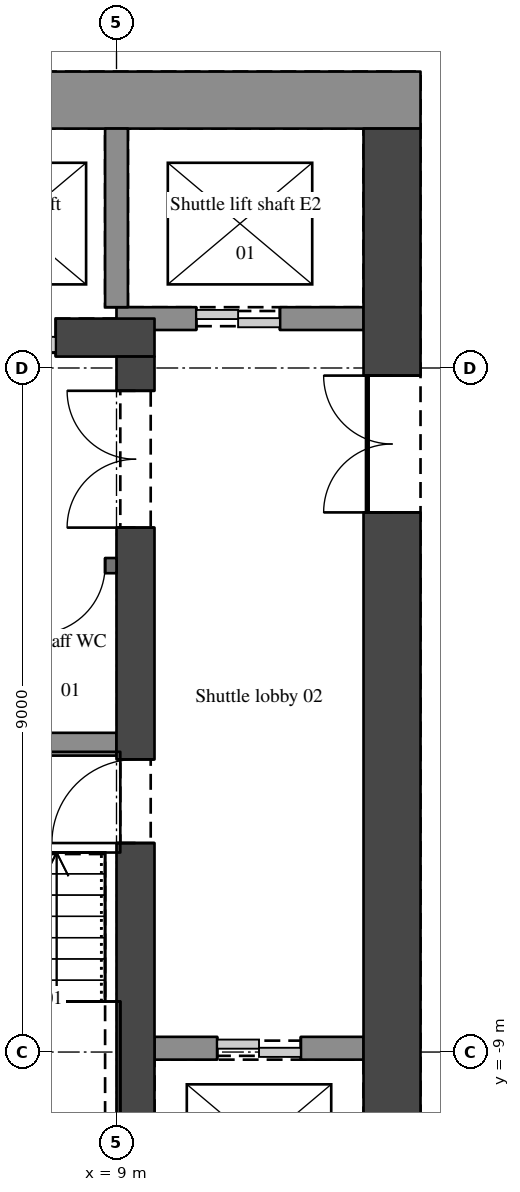
"""IFC4 building model, lengths in metres.
Left out: names, types, materials, properties, quantities, classifications, styles, units other than length and angle.
Written with IfcOpenShell. Run it as: python <this file> out.ifc"""

import sys

from ifc_helpers import new_model, si_unit, direction, frame, frame_2d, origin, place, context, subcontext, project, spatial, rectangle, extrude, element, fill, save


model = new_model("IFC4")
c1 = context("Model", 3, precision=1e-05, world=origin(), true_north=direction((0.0, 1.0)))
c2 = subcontext(c1, "Body", "Model", "MODEL_VIEW")
j1 = project(units=[si_unit("LENGTHUNIT", "METRE"), si_unit("PLANEANGLEUNIT", "RADIAN")], contexts=[c1])
p1 = place(None, origin())
s1 = spatial("IfcSite", under=j1, at=p1, CompositionType="ELEMENT")
p2 = place(p1, origin())
s2 = spatial("IfcBuilding", under=s1, at=p2, CompositionType="ELEMENT")
p3 = place(p2, frame((0.0, 0.0, 162.3)))
s3 = spatial("IfcBuildingStorey", under=s2, at=p3, CompositionType="ELEMENT", Elevation=162.3)
p4 = place(p3, frame((-13.0, 3.525, 0.0), z_axis=(0.0, 0.0, 1.0), x_axis=(1.0, 0.0, 0.0)))
e1 = element("IfcWall", 1, at=p4, inside=s3, PredefinedType="SHEAR", context=c2, shape_type="SweptSolid", body=[
    extrude(rectangle(XDim=26.0, YDim=0.75, at=frame_2d((13.0, 0.0))), origin(), (0.0, 0.0, 1.0), 5.4),
])
p5 = place(p3, frame((12.625, -11.5, 0.0), z_axis=(0.0, 0.0, 1.0), x_axis=(0.0, 1.0, 0.0)))
e2 = element("IfcWall", 2, at=p5, inside=s3, PredefinedType="SHEAR", context=c2, shape_type="SweptSolid", body=[
    extrude(rectangle(XDim=14.65, YDim=0.75, at=frame_2d((7.325, 0.0))), origin(), (0.0, 0.0, 1.0), 5.4),
])
p6 = place(p5, frame((9.6, 0.0, 0.0)))
e3 = element("IfcOpeningElement", 3, at=p6, cuts=e2, PredefinedType="OPENING", context=c2, shape_type="SweptSolid", body=[
    extrude(rectangle(XDim=1.8, YDim=2.1, at=frame_2d((0.9, 1.05))), frame((0.0, 0.385, 0.0), z_axis=(0.0, -1.0, 0.0), x_axis=(1.0, 0.0, 0.0)), (0.0, 0.0, 1.0), 0.77),
])
p7 = place(p3, frame((-9.5, 0.4, 0.0), z_axis=(0.0, 0.0, 1.0), x_axis=(1.0, 0.0, 0.0)))
e4 = element("IfcWall", 4, at=p7, inside=s3, PredefinedType="SHEAR", context=c2, shape_type="SweptSolid", body=[
    extrude(rectangle(XDim=19.0, YDim=0.5, at=frame_2d((9.5, 0.0))), origin(), (0.0, 0.0, 1.0), 5.4),
])
p8 = place(p7, frame((1.3, 0.0, 0.0)))
e5 = element("IfcOpeningElement", 5, at=p8, cuts=e4, PredefinedType="OPENING", context=c2, shape_type="SweptSolid", body=[
    extrude(rectangle(XDim=1.1, YDim=2.1, at=frame_2d((0.55, 1.05))), frame((0.0, 0.26, 0.0), z_axis=(0.0, -1.0, 0.0), x_axis=(1.0, 0.0, 0.0)), (0.0, 0.0, 1.0), 0.52),
])
p9 = place(p7, frame((4.0, 0.0, 0.0)))
e6 = element("IfcOpeningElement", 6, at=p9, cuts=e4, PredefinedType="OPENING", context=c2, shape_type="SweptSolid", body=[
    extrude(rectangle(XDim=1.1, YDim=2.1, at=frame_2d((0.55, 1.05))), frame((0.0, 0.26, 0.0), z_axis=(0.0, -1.0, 0.0), x_axis=(1.0, 0.0, 0.0)), (0.0, 0.0, 1.0), 0.52),
])
p10 = place(p7, frame((6.7, 0.0, 0.0)))
e7 = element("IfcOpeningElement", 7, at=p10, cuts=e4, PredefinedType="OPENING", context=c2, shape_type="SweptSolid", body=[
    extrude(rectangle(XDim=1.1, YDim=2.1, at=frame_2d((0.55, 1.05))), frame((0.0, 0.26, 0.0), z_axis=(0.0, -1.0, 0.0), x_axis=(1.0, 0.0, 0.0)), (0.0, 0.0, 1.0), 0.52),
])
p11 = place(p7, frame((11.2, 0.0, 0.0)))
e8 = element("IfcOpeningElement", 8, at=p11, cuts=e4, PredefinedType="OPENING", context=c2, shape_type="SweptSolid", body=[
    extrude(rectangle(XDim=1.1, YDim=2.1, at=frame_2d((0.55, 1.05))), frame((0.0, 0.26, 0.0), z_axis=(0.0, -1.0, 0.0), x_axis=(1.0, 0.0, 0.0)), (0.0, 0.0, 1.0), 0.52),
])
p12 = place(p7, frame((13.9, 0.0, 0.0)))
e9 = element("IfcOpeningElement", 9, at=p12, cuts=e4, PredefinedType="OPENING", context=c2, shape_type="SweptSolid", body=[
    extrude(rectangle(XDim=1.1, YDim=2.1, at=frame_2d((0.55, 1.05))), frame((0.0, 0.26, 0.0), z_axis=(0.0, -1.0, 0.0), x_axis=(1.0, 0.0, 0.0)), (0.0, 0.0, 1.0), 0.52),
])
p13 = place(p7, frame((16.6, 0.0, 0.0)))
e10 = element("IfcOpeningElement", 10, at=p13, cuts=e4, PredefinedType="OPENING", context=c2, shape_type="SweptSolid", body=[
    extrude(rectangle(XDim=1.1, YDim=2.1, at=frame_2d((0.55, 1.05))), frame((0.0, 0.26, 0.0), z_axis=(0.0, -1.0, 0.0), x_axis=(1.0, 0.0, 0.0)), (0.0, 0.0, 1.0), 0.52),
])
p14 = place(p3, frame((9.25, -11.5, 0.0), z_axis=(0.0, 0.0, 1.0), x_axis=(0.0, 1.0, 0.0)))
e11 = element("IfcWall", 11, at=p14, inside=s3, PredefinedType="SHEAR", context=c2, shape_type="SweptSolid", body=[
    extrude(rectangle(XDim=11.65, YDim=0.5, at=frame_2d((5.825, 0.0))), origin(), (0.0, 0.0, 1.0), 5.4),
])
p15 = place(p14, frame((9.4, 0.0, 0.0)))
e12 = element("IfcOpeningElement", 12, at=p15, cuts=e11, PredefinedType="OPENING", context=c2, shape_type="SweptSolid", body=[
    extrude(rectangle(XDim=1.8, YDim=2.1, at=frame_2d((0.9, 1.05))), frame((0.0, 0.26, 0.0), z_axis=(0.0, -1.0, 0.0), x_axis=(1.0, 0.0, 0.0)), (0.0, 0.0, 1.0), 0.52),
])
p16 = place(p14, frame((5.25, 0.0, 0.0)))
e13 = element("IfcOpeningElement", 13, at=p16, cuts=e11, PredefinedType="OPENING", context=c2, shape_type="SweptSolid", body=[
    extrude(rectangle(XDim=1.1, YDim=2.1, at=frame_2d((0.55, 1.05))), frame((0.0, 0.26, 0.0), z_axis=(0.0, -1.0, 0.0), x_axis=(1.0, 0.0, 0.0)), (0.0, 0.0, 1.0), 0.52),
])
p17 = place(p3, frame((9.5, -8.95, 0.0), z_axis=(0.0, 0.0, 1.0), x_axis=(1.0, 0.0, 0.0)))
e14 = element("IfcWall", 14, at=p17, inside=s3, PredefinedType="SHEAR", context=c2, shape_type="SweptSolid", body=[
    extrude(rectangle(XDim=2.75, YDim=0.3, at=frame_2d((1.375, 0.0))), origin(), (0.0, 0.0, 1.0), 5.4),
])
p18 = place(p17, frame((0.825, 0.0, 0.0)))
e15 = element("IfcOpeningElement", 15, at=p18, cuts=e14, PredefinedType="OPENING", context=c2, shape_type="SweptSolid", body=[
    extrude(rectangle(XDim=1.1, YDim=2.1, at=frame_2d((0.55, 1.05))), frame((0.0, 0.16, 0.0), z_axis=(0.0, -1.0, 0.0), x_axis=(1.0, 0.0, 0.0)), (0.0, 0.0, 1.0), 0.32),
])
p19 = place(p3, frame((2.25, -4.95, 0.0), z_axis=(0.0, 0.0, 1.0), x_axis=(1.0, 0.0, 0.0)))
e16 = element("IfcWall", 16, at=p19, inside=s3, PredefinedType="SHEAR", context=c2, shape_type="SweptSolid", body=[
    extrude(rectangle(XDim=6.75, YDim=0.3, at=frame_2d((3.375, 0.0))), origin(), (0.0, 0.0, 1.0), 5.4),
])
p20 = place(p3, frame((9.0, -2.6, 0.0), z_axis=(0.0, 0.0, 1.0), x_axis=(-1.0, 0.0, 0.0)))
e17 = element("IfcWall", 17, at=p20, inside=s3, PredefinedType="SOLIDWALL", context=c2, shape_type="SweptSolid", body=[
    extrude(rectangle(XDim=1.2, YDim=0.2, at=frame_2d((0.6, 0.0))), origin(), (0.0, 0.0, 1.0), 5.1),
])
p21 = place(p20, frame((0.15, 0.0, 0.0)))
e18 = element("IfcOpeningElement", 18, at=p21, cuts=e17, PredefinedType="OPENING", context=c2, shape_type="SweptSolid", body=[
    extrude(rectangle(XDim=0.9, YDim=2.1, at=frame_2d((0.45, 1.05))), frame((0.0, 0.11, 0.0), z_axis=(0.0, -1.0, 0.0), x_axis=(1.0, 0.0, 0.0)), (0.0, 0.0, 1.0), 0.22),
])
p22 = place(p3, frame((12.25, 0.65, 0.0), z_axis=(0.0, 0.0, 1.0), x_axis=(-1.0, 0.0, 0.0)))
e19 = element("IfcWall", 19, at=p22, inside=s3, PredefinedType="SHEAR", context=c2, shape_type="SweptSolid", body=[
    extrude(rectangle(XDim=3.25, YDim=0.3, at=frame_2d((1.625, 0.0))), origin(), (0.0, 0.0, 1.0), 5.4),
])
p23 = place(p22, frame((1.1, 0.0, 0.0)))
e20 = element("IfcOpeningElement", 20, at=p23, cuts=e19, PredefinedType="OPENING", context=c2, shape_type="SweptSolid", body=[
    extrude(rectangle(XDim=1.1, YDim=2.1, at=frame_2d((0.55, 1.05))), frame((0.0, 0.16, 0.0), z_axis=(0.0, -1.0, 0.0), x_axis=(1.0, 0.0, 0.0)), (0.0, 0.0, 1.0), 0.32),
])
p24 = place(p3, frame((9.0, 0.8, 0.0), z_axis=(0.0, 0.0, 1.0), x_axis=(0.0, 1.0, 0.0)))
e21 = element("IfcWall", 21, at=p24, inside=s3, PredefinedType="SHEAR", context=c2, shape_type="SweptSolid", body=[
    extrude(rectangle(XDim=2.35, YDim=0.3, at=frame_2d((1.175, 0.0))), origin(), (0.0, 0.0, 1.0), 5.4),
])
p25 = place(p6, origin())
e22 = element("IfcDoor", 22, at=p25, inside=s3, OperationType="DOUBLE_DOOR_SINGLE_SWING", PredefinedType="DOOR", context=c2, shape_type="SweptSolid", body=[
    extrude(rectangle(XDim=1.8, YDim=2.1, at=frame_2d((0.9, 1.05))), frame((0.0, 0.025, 0.0), z_axis=(0.0, -1.0, 0.0), x_axis=(1.0, 0.0, 0.0)), (0.0, 0.0, 1.0), 0.05),
])
fill(e3, e22)
p26 = place(p15, origin())
e23 = element("IfcDoor", 23, at=p26, inside=s3, OperationType="DOUBLE_DOOR_SINGLE_SWING", PredefinedType="DOOR", context=c2, shape_type="SweptSolid", body=[
    extrude(rectangle(XDim=1.8, YDim=2.1, at=frame_2d((0.9, 1.05))), frame((0.0, 0.025, 0.0), z_axis=(0.0, -1.0, 0.0), x_axis=(1.0, 0.0, 0.0)), (0.0, 0.0, 1.0), 0.05),
])
fill(e12, e23)
p27 = place(p16, origin())
e24 = element("IfcDoor", 24, at=p27, inside=s3, OperationType="SINGLE_SWING_LEFT", PredefinedType="DOOR", context=c2, shape_type="SweptSolid", body=[
    extrude(rectangle(XDim=1.1, YDim=2.1, at=frame_2d((0.55, 1.05))), frame((0.0, 0.025, 0.0), z_axis=(0.0, -1.0, 0.0), x_axis=(1.0, 0.0, 0.0)), (0.0, 0.0, 1.0), 0.05),
])
fill(e13, e24)
p28 = place(p21, origin())
e25 = element("IfcDoor", 25, at=p28, inside=s3, OperationType="SINGLE_SWING_RIGHT", PredefinedType="DOOR", context=c2, shape_type="SweptSolid", body=[
    extrude(rectangle(XDim=0.9, YDim=2.1, at=frame_2d((0.45, 1.05))), frame((0.0, 0.025, 0.0), z_axis=(0.0, -1.0, 0.0), x_axis=(1.0, 0.0, 0.0)), (0.0, 0.0, 1.0), 0.05),
])
fill(e18, e25)
p29 = place(p13, origin())
e26 = element("IfcDoor", 26, at=p29, inside=s3, OperationType="DOUBLE_DOOR_SLIDING", PredefinedType="DOOR", context=c2, shape_type="SweptSolid", body=[
    extrude(rectangle(XDim=1.1, YDim=2.1, at=frame_2d((0.55, 1.05))), frame((0.0, 0.025, 0.0), z_axis=(0.0, -1.0, 0.0), x_axis=(1.0, 0.0, 0.0)), (0.0, 0.0, 1.0), 0.05),
])
fill(e10, e26)
p30 = place(p23, origin())
e27 = element("IfcDoor", 27, at=p30, inside=s3, OperationType="DOUBLE_DOOR_SLIDING", PredefinedType="DOOR", context=c2, shape_type="SweptSolid", body=[
    extrude(rectangle(XDim=1.1, YDim=2.1, at=frame_2d((0.55, 1.05))), frame((0.0, 0.025, 0.0), z_axis=(0.0, -1.0, 0.0), x_axis=(1.0, 0.0, 0.0)), (0.0, 0.0, 1.0), 0.05),
])
fill(e20, e27)
p31 = place(p18, origin())
e28 = element("IfcDoor", 28, at=p31, inside=s3, OperationType="DOUBLE_DOOR_SLIDING", PredefinedType="DOOR", context=c2, shape_type="SweptSolid", body=[
    extrude(rectangle(XDim=1.1, YDim=2.1, at=frame_2d((0.55, 1.05))), frame((0.0, 0.025, 0.0), z_axis=(0.0, -1.0, 0.0), x_axis=(1.0, 0.0, 0.0)), (0.0, 0.0, 1.0), 0.05),
])
fill(e15, e28)
save(model, sys.argv[1])
